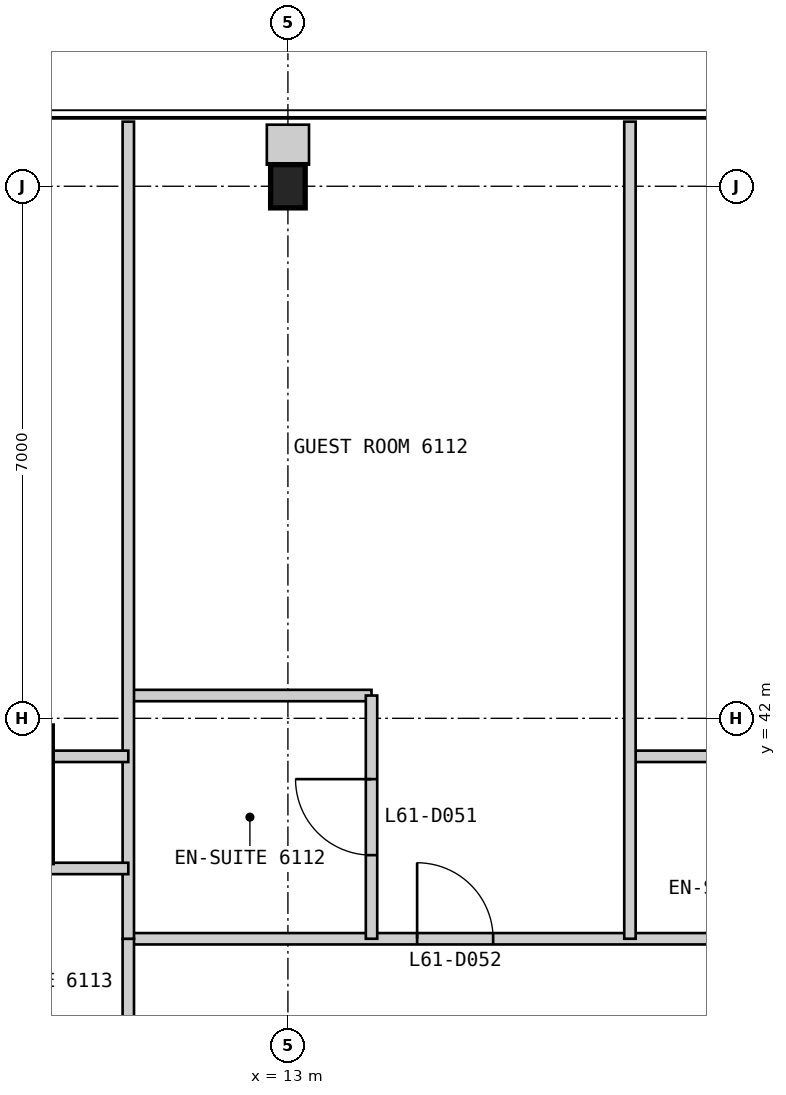
"""IFC4 building model, lengths in metres.
Left out: names, types, materials, properties, quantities, classifications, styles, units other than length and angle.
Written with IfcOpenShell. Run it as: python <this file> out.ifc"""

import sys

from ifc_helpers import new_model, si_unit, direction, frame, frame_2d, origin, origin_2d, place, context, subcontext, project, spatial, rectangle, i_section, extrude, element, fill, save


model = new_model("IFC4")
c1 = context("Model", 3, precision=1e-05, world=origin(), true_north=direction((0.0, 1.0)))
c2 = subcontext(c1, "Body", "Model", "MODEL_VIEW")
j1 = project(units=[si_unit("LENGTHUNIT", "METRE"), si_unit("PLANEANGLEUNIT", "RADIAN")], contexts=[c1])
p1 = place(None, origin())
s1 = spatial("IfcSite", under=j1, at=p1, CompositionType="ELEMENT")
p2 = place(p1, origin())
s2 = spatial("IfcBuilding", under=s1, at=p2, CompositionType="ELEMENT")
p3 = place(p2, frame((0.0, 0.0, 259.4)))
s3 = spatial("IfcBuildingStorey", under=s2, at=p3, CompositionType="ELEMENT", Elevation=259.4)
p4 = place(p3, frame((9.0, 41.0, 0.0), z_axis=(0.0, 0.0, 1.0), x_axis=(1.0, 0.0, 0.0)))
e1 = element("IfcColumn", 1, at=p4, inside=s3, PredefinedType="COLUMN", context=c2, shape_type="SweptSolid", body=[
    extrude(rectangle(XDim=1.8, YDim=1.8, at=origin_2d()), origin(), (0.0, 0.0, 1.0), 3.4),
])
p5 = place(p3, frame((13.0, 49.0, 0.0), z_axis=(0.0, 0.0, 1.0), x_axis=(1.0, 0.0, 0.0)))
e2 = element("IfcColumn", 2, at=p5, inside=s3, PredefinedType="COLUMN", context=c2, shape_type="SweptSolid", body=[
    extrude(i_section(OverallWidth=0.455, OverallDepth=0.569, WebThickness=0.078, FlangeThickness=0.125, at=origin_2d()), origin(), (0.0, 0.0, 1.0), 3.4),
])
p6 = place(p3, frame((39.1, 39.1, 0.0), z_axis=(0.0, 0.0, 1.0), x_axis=(-1.0, 0.0, 0.0)))
e3 = element("IfcWall", 3, at=p6, inside=s3, PredefinedType="PARTITIONING", context=c2, shape_type="SweptSolid", body=[
    extrude(rectangle(XDim=28.2, YDim=0.15, at=frame_2d((14.1, 0.0))), origin(), (0.0, 0.0, 1.0), 3.25),
])
p7 = place(p6, frame((2.375, 0.0, 0.0)))
e4 = element("IfcOpeningElement", 4, at=p7, cuts=e3, PredefinedType="OPENING", context=c2, shape_type="SweptSolid", body=[
    extrude(rectangle(XDim=0.9, YDim=2.1, at=frame_2d((0.45, 1.05))), frame((0.0, 0.085, 0.0), z_axis=(0.0, -1.0, 0.0), x_axis=(1.0, 0.0, 0.0)), (0.0, 0.0, 1.0), 0.17),
])
p8 = place(p6, frame((10.7, 0.0, 0.0)))
e5 = element("IfcOpeningElement", 5, at=p8, cuts=e3, PredefinedType="OPENING", context=c2, shape_type="SweptSolid", body=[
    extrude(rectangle(XDim=0.9, YDim=2.1, at=frame_2d((0.45, 1.05))), frame((0.0, 0.085, 0.0), z_axis=(0.0, -1.0, 0.0), x_axis=(1.0, 0.0, 0.0)), (0.0, 0.0, 1.0), 0.17),
])
p9 = place(p6, frame((17.1, 0.0, 0.0)))
e6 = element("IfcOpeningElement", 6, at=p9, cuts=e3, PredefinedType="OPENING", context=c2, shape_type="SweptSolid", body=[
    extrude(rectangle(XDim=0.9, YDim=2.1, at=frame_2d((0.45, 1.05))), frame((0.0, 0.085, 0.0), z_axis=(0.0, -1.0, 0.0), x_axis=(1.0, 0.0, 0.0)), (0.0, 0.0, 1.0), 0.17),
])
p10 = place(p6, frame((23.4, 0.0, 0.0)))
e7 = element("IfcOpeningElement", 7, at=p10, cuts=e3, PredefinedType="OPENING", context=c2, shape_type="SweptSolid", body=[
    extrude(rectangle(XDim=1.0, YDim=2.1, at=frame_2d((0.5, 1.05))), frame((0.0, 0.085, 0.0), z_axis=(0.0, -1.0, 0.0), x_axis=(1.0, 0.0, 0.0)), (0.0, 0.0, 1.0), 0.17),
])
p11 = place(p3, frame((20.5, 41.5, 0.0), z_axis=(0.0, 0.0, 1.0), x_axis=(-1.0, 0.0, 0.0)))
e8 = element("IfcWall", 8, at=p11, inside=s3, PredefinedType="PARTITIONING", context=c2, shape_type="SweptSolid", body=[
    extrude(rectangle(XDim=3.0, YDim=0.15, at=frame_2d((1.5, 0.0))), origin(), (0.0, 0.0, 1.0), 3.25),
])
p12 = place(p3, frame((17.5, 49.85, 0.0), z_axis=(0.0, 0.0, 1.0), x_axis=(0.0, -1.0, 0.0)))
e9 = element("IfcWall", 9, at=p12, inside=s3, PredefinedType="PARTITIONING", context=c2, shape_type="SweptSolid", body=[
    extrude(rectangle(XDim=10.75, YDim=0.15, at=frame_2d((5.375, 0.0))), origin(), (0.0, 0.0, 1.0), 3.25),
])
p13 = place(p3, frame((14.1, 42.3, 0.0), z_axis=(0.0, 0.0, 1.0), x_axis=(-1.0, 0.0, 0.0)))
e10 = element("IfcWall", 10, at=p13, inside=s3, PredefinedType="PARTITIONING", context=c2, shape_type="SweptSolid", body=[
    extrude(rectangle(XDim=3.2, YDim=0.15, at=frame_2d((1.6, 0.0))), origin(), (0.0, 0.0, 1.0), 3.25),
])
p14 = place(p3, frame((14.1, 42.3, 0.0), z_axis=(0.0, 0.0, 1.0), x_axis=(0.0, -1.0, 0.0)))
e11 = element("IfcWall", 11, at=p14, inside=s3, PredefinedType="PARTITIONING", context=c2, shape_type="SweptSolid", body=[
    extrude(rectangle(XDim=3.2, YDim=0.15, at=frame_2d((1.6, 0.0))), origin(), (0.0, 0.0, 1.0), 3.25),
])
p15 = place(p14, frame((1.1, 0.0, 0.0)))
e12 = element("IfcOpeningElement", 12, at=p15, cuts=e11, PredefinedType="OPENING", context=c2, shape_type="SweptSolid", body=[
    extrude(rectangle(XDim=1.0, YDim=2.1, at=frame_2d((0.5, 1.05))), frame((0.0, 0.085, 0.0), z_axis=(0.0, -1.0, 0.0), x_axis=(1.0, 0.0, 0.0)), (0.0, 0.0, 1.0), 0.17),
])
p16 = place(p3, frame((10.9, 39.1, 0.0), z_axis=(0.0, 0.0, 1.0), x_axis=(0.0, -1.0, 0.0)))
e13 = element("IfcWall", 13, at=p16, inside=s3, PredefinedType="PARTITIONING", context=c2, shape_type="SweptSolid", body=[
    extrude(rectangle(XDim=28.2, YDim=0.15, at=frame_2d((14.1, 0.0))), origin(), (0.0, 0.0, 1.0), 3.25),
])
p17 = place(p16, frame((2.375, 0.0, 0.0)))
e14 = element("IfcOpeningElement", 14, at=p17, cuts=e13, PredefinedType="OPENING", context=c2, shape_type="SweptSolid", body=[
    extrude(rectangle(XDim=0.9, YDim=2.1, at=frame_2d((0.45, 1.05))), frame((0.0, 0.085, 0.0), z_axis=(0.0, -1.0, 0.0), x_axis=(1.0, 0.0, 0.0)), (0.0, 0.0, 1.0), 0.17),
])
p18 = place(p16, frame((10.7, 0.0, 0.0)))
e15 = element("IfcOpeningElement", 15, at=p18, cuts=e13, PredefinedType="OPENING", context=c2, shape_type="SweptSolid", body=[
    extrude(rectangle(XDim=0.9, YDim=2.1, at=frame_2d((0.45, 1.05))), frame((0.0, 0.085, 0.0), z_axis=(0.0, -1.0, 0.0), x_axis=(1.0, 0.0, 0.0)), (0.0, 0.0, 1.0), 0.17),
])
p19 = place(p16, frame((17.1, 0.0, 0.0)))
e16 = element("IfcOpeningElement", 16, at=p19, cuts=e13, PredefinedType="OPENING", context=c2, shape_type="SweptSolid", body=[
    extrude(rectangle(XDim=0.9, YDim=2.1, at=frame_2d((0.45, 1.05))), frame((0.0, 0.085, 0.0), z_axis=(0.0, -1.0, 0.0), x_axis=(1.0, 0.0, 0.0)), (0.0, 0.0, 1.0), 0.17),
])
p20 = place(p16, frame((23.7, 0.0, 0.0)))
e17 = element("IfcOpeningElement", 17, at=p20, cuts=e13, PredefinedType="OPENING", context=c2, shape_type="SweptSolid", body=[
    extrude(rectangle(XDim=0.9, YDim=2.1, at=frame_2d((0.45, 1.05))), frame((0.0, 0.085, 0.0), z_axis=(0.0, -1.0, 0.0), x_axis=(1.0, 0.0, 0.0)), (0.0, 0.0, 1.0), 0.17),
])
p21 = place(p3, frame((10.9, 49.85, 0.0), z_axis=(0.0, 0.0, 1.0), x_axis=(0.0, -1.0, 0.0)))
e18 = element("IfcWall", 18, at=p21, inside=s3, PredefinedType="PARTITIONING", context=c2, shape_type="SweptSolid", body=[
    extrude(rectangle(XDim=10.75, YDim=0.15, at=frame_2d((5.375, 0.0))), origin(), (0.0, 0.0, 1.0), 3.25),
])
p22 = place(p3, frame((8.5, 40.025, 0.0), z_axis=(0.0, 0.0, 1.0), x_axis=(1.0, 0.0, 0.0)))
e19 = element("IfcWall", 19, at=p22, inside=s3, PredefinedType="PARTITIONING", context=c2, shape_type="SweptSolid", body=[
    extrude(rectangle(XDim=2.4, YDim=0.15, at=frame_2d((1.2, 0.0))), origin(), (0.0, 0.0, 1.0), 3.25),
])
p23 = place(p3, frame((0.15, 41.5, 0.0), z_axis=(0.0, 0.0, 1.0), x_axis=(1.0, 0.0, 0.0)))
e20 = element("IfcWall", 20, at=p23, inside=s3, PredefinedType="PARTITIONING", context=c2, shape_type="SweptSolid", body=[
    extrude(rectangle(XDim=10.75, YDim=0.15, at=frame_2d((5.375, 0.0))), origin(), (0.0, 0.0, 1.0), 3.25),
])
p24 = place(p23, frame((5.0, 0.0, 0.0)))
e21 = element("IfcOpeningElement", 21, at=p24, cuts=e20, PredefinedType="OPENING", context=c2, shape_type="SweptSolid", body=[
    extrude(rectangle(XDim=0.9, YDim=2.1, at=frame_2d((0.45, 1.05))), frame((0.0, 0.085, 0.0), z_axis=(0.0, -1.0, 0.0), x_axis=(1.0, 0.0, 0.0)), (0.0, 0.0, 1.0), 0.17),
])
p25 = place(p3, frame((13.0, 49.81, 0.0), z_axis=(0.0, 0.0, 1.0), x_axis=(0.0, -1.0, 0.0)))
e22 = element("IfcWall", 22, at=p25, inside=s3, PredefinedType="PARTITIONING", context=c2, shape_type="SweptSolid", body=[
    extrude(rectangle(XDim=0.526, YDim=0.555, at=frame_2d((0.263, 0.0))), origin(), (0.0, 0.0, 1.0), 3.25),
])
p26 = place(p15, frame((1.0, 0.0, 0.0), z_axis=(0.0, 0.0, 1.0), x_axis=(-1.0, 0.0, 0.0)))
e23 = element("IfcDoor", 23, at=p26, inside=s3, OperationType="SINGLE_SWING_RIGHT", PredefinedType="DOOR", context=c2, shape_type="SweptSolid", body=[
    extrude(rectangle(XDim=1.0, YDim=2.1, at=frame_2d((0.5, 1.05))), frame((0.0, 0.025, 0.0), z_axis=(0.0, -1.0, 0.0), x_axis=(1.0, 0.0, 0.0)), (0.0, 0.0, 1.0), 0.05),
])
fill(e12, e23)
p27 = place(p10, frame((1.0, 0.0, 0.0), z_axis=(0.0, 0.0, 1.0), x_axis=(-1.0, 0.0, 0.0)))
e24 = element("IfcDoor", 24, at=p27, inside=s3, OperationType="SINGLE_SWING_LEFT", PredefinedType="DOOR", context=c2, shape_type="SweptSolid", body=[
    extrude(rectangle(XDim=1.0, YDim=2.1, at=frame_2d((0.5, 1.05))), frame((0.0, 0.025, 0.0), z_axis=(0.0, -1.0, 0.0), x_axis=(1.0, 0.0, 0.0)), (0.0, 0.0, 1.0), 0.05),
])
fill(e7, e24)
save(model, sys.argv[1])
